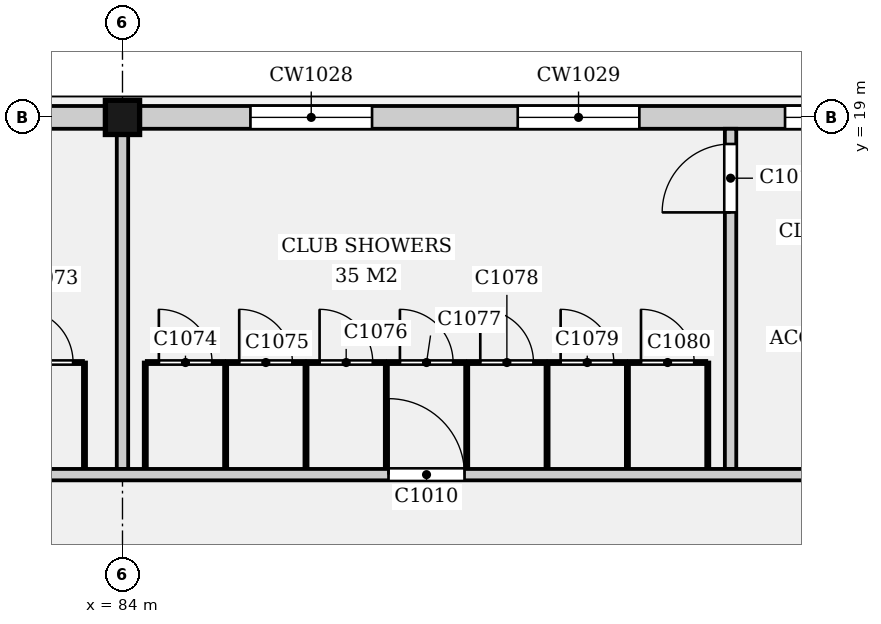
"""IFC4 building model, lengths in metres.
Left out: names, types, materials, properties, quantities, classifications, styles, units other than length and angle.
Written with IfcOpenShell. Run it as: python <this file> out.ifc"""

import sys

from ifc_helpers import new_model, si_unit, direction, frame, frame_2d, origin, origin_2d, place, context, subcontext, project, spatial, rectangle, extrude, element, fill, save


model = new_model("IFC4")
c1 = context("Model", 3, precision=1e-05, world=origin(), true_north=direction((0.0, 1.0)))
c2 = subcontext(c1, "Body", "Model", "MODEL_VIEW")
j1 = project(units=[si_unit("LENGTHUNIT", "METRE"), si_unit("PLANEANGLEUNIT", "RADIAN")], contexts=[c1])
p1 = place(None, origin())
s1 = spatial("IfcSite", under=j1, at=p1, CompositionType="ELEMENT")
p2 = place(p1, origin())
s2 = spatial("IfcBuilding", under=s1, at=p2, CompositionType="ELEMENT")
p3 = place(p2, frame((0.0, 0.0, 5.0)))
s3 = spatial("IfcBuildingStorey", under=s2, at=p3, CompositionType="ELEMENT", Elevation=5.0)
p4 = place(p3, frame((84.0, 19.0, 0.0), z_axis=(0.0, 0.0, 1.0), x_axis=(1.0, 0.0, 0.0)))
e1 = element("IfcColumn", 1, at=p4, inside=s3, PredefinedType="COLUMN", context=c2, shape_type="SweptSolid", body=[
    extrude(rectangle(XDim=0.45, YDim=0.45, at=origin_2d()), origin(), (0.0, 0.0, 1.0), 4.4),
])
p5 = place(p3, frame((72.225, 19.0, 0.0), z_axis=(0.0, 0.0, 1.0), x_axis=(1.0, 0.0, 0.0)))
e2 = element("IfcWall", 2, at=p5, inside=s3, PredefinedType="ELEMENTEDWALL", context=c2, shape_type="SweptSolid", body=[
    extrude(rectangle(XDim=11.55, YDim=0.3, at=frame_2d((5.775, 0.0))), origin(), (0.0, 0.0, 1.0), 3.98),
])
p6 = place(p5, frame((1.458, 0.0, 1.4)))
e3 = element("IfcOpeningElement", 3, at=p6, cuts=e2, PredefinedType="OPENING", context=c2, shape_type="SweptSolid", body=[
    extrude(rectangle(XDim=1.6, YDim=1.2, at=frame_2d((0.8, 0.6))), frame((0.0, 0.16, 0.0), z_axis=(0.0, -1.0, 0.0), x_axis=(1.0, 0.0, 0.0)), (0.0, 0.0, 1.0), 0.32),
])
p7 = place(p5, frame((4.975, 0.0, 1.4)))
e4 = element("IfcOpeningElement", 4, at=p7, cuts=e2, PredefinedType="OPENING", context=c2, shape_type="SweptSolid", body=[
    extrude(rectangle(XDim=1.6, YDim=1.2, at=frame_2d((0.8, 0.6))), frame((0.0, 0.16, 0.0), z_axis=(0.0, -1.0, 0.0), x_axis=(1.0, 0.0, 0.0)), (0.0, 0.0, 1.0), 0.32),
])
p8 = place(p5, frame((8.492, 0.0, 1.4)))
e5 = element("IfcOpeningElement", 5, at=p8, cuts=e2, PredefinedType="OPENING", context=c2, shape_type="SweptSolid", body=[
    extrude(rectangle(XDim=1.6, YDim=1.2, at=frame_2d((0.8, 0.6))), frame((0.0, 0.16, 0.0), z_axis=(0.0, -1.0, 0.0), x_axis=(1.0, 0.0, 0.0)), (0.0, 0.0, 1.0), 0.32),
])
p9 = place(p3, frame((84.225, 19.0, 0.0), z_axis=(0.0, 0.0, 1.0), x_axis=(1.0, 0.0, 0.0)))
e6 = element("IfcWall", 6, at=p9, inside=s3, PredefinedType="ELEMENTEDWALL", context=c2, shape_type="SweptSolid", body=[
    extrude(rectangle(XDim=11.55, YDim=0.3, at=frame_2d((5.775, 0.0))), origin(), (0.0, 0.0, 1.0), 3.98),
])
p10 = place(p9, frame((1.458, 0.0, 1.4)))
e7 = element("IfcOpeningElement", 7, at=p10, cuts=e6, PredefinedType="OPENING", context=c2, shape_type="SweptSolid", body=[
    extrude(rectangle(XDim=1.6, YDim=1.2, at=frame_2d((0.8, 0.6))), frame((0.0, 0.16, 0.0), z_axis=(0.0, -1.0, 0.0), x_axis=(1.0, 0.0, 0.0)), (0.0, 0.0, 1.0), 0.32),
])
p11 = place(p9, frame((4.975, 0.0, 1.4)))
e8 = element("IfcOpeningElement", 8, at=p11, cuts=e6, PredefinedType="OPENING", context=c2, shape_type="SweptSolid", body=[
    extrude(rectangle(XDim=1.6, YDim=1.2, at=frame_2d((0.8, 0.6))), frame((0.0, 0.16, 0.0), z_axis=(0.0, -1.0, 0.0), x_axis=(1.0, 0.0, 0.0)), (0.0, 0.0, 1.0), 0.32),
])
p12 = place(p9, frame((8.492, 0.0, 1.4)))
e9 = element("IfcOpeningElement", 9, at=p12, cuts=e6, PredefinedType="OPENING", context=c2, shape_type="SweptSolid", body=[
    extrude(rectangle(XDim=1.6, YDim=1.2, at=frame_2d((0.8, 0.6))), frame((0.0, 0.16, 0.0), z_axis=(0.0, -1.0, 0.0), x_axis=(1.0, 0.0, 0.0)), (0.0, 0.0, 1.0), 0.32),
])
p13 = place(p3, frame((55.3, 14.3, 0.0), z_axis=(0.0, 0.0, 1.0), x_axis=(1.0, 0.0, 0.0)))
e10 = element("IfcWall", 10, at=p13, inside=s3, PredefinedType="PARTITIONING", context=c2, shape_type="SweptSolid", body=[
    extrude(rectangle(XDim=93.4, YDim=0.15, at=frame_2d((46.7, 0.0))), origin(), (0.0, 0.0, 1.0), 3.98),
])
p14 = place(p13, frame((15.8, 0.0, 0.0)))
e11 = element("IfcOpeningElement", 11, at=p14, cuts=e10, PredefinedType="OPENING", context=c2, shape_type="SweptSolid", body=[
    extrude(rectangle(XDim=1.8, YDim=2.4, at=frame_2d((0.9, 1.2))), frame((0.0, 0.085, 0.0), z_axis=(0.0, -1.0, 0.0), x_axis=(1.0, 0.0, 0.0)), (0.0, 0.0, 1.0), 0.17),
])
p15 = place(p13, frame((32.2, 0.0, 0.0)))
e12 = element("IfcOpeningElement", 12, at=p15, cuts=e10, PredefinedType="OPENING", context=c2, shape_type="SweptSolid", body=[
    extrude(rectangle(XDim=1.0, YDim=2.1, at=frame_2d((0.5, 1.05))), frame((0.0, 0.085, 0.0), z_axis=(0.0, -1.0, 0.0), x_axis=(1.0, 0.0, 0.0)), (0.0, 0.0, 1.0), 0.17),
])
p16 = place(p13, frame((38.2, 0.0, 0.0)))
e13 = element("IfcOpeningElement", 13, at=p16, cuts=e10, PredefinedType="OPENING", context=c2, shape_type="SweptSolid", body=[
    extrude(rectangle(XDim=1.0, YDim=2.1, at=frame_2d((0.5, 1.05))), frame((0.0, 0.085, 0.0), z_axis=(0.0, -1.0, 0.0), x_axis=(1.0, 0.0, 0.0)), (0.0, 0.0, 1.0), 0.17),
])
p17 = place(p13, frame((45.7, 0.0, 0.0)))
e14 = element("IfcOpeningElement", 14, at=p17, cuts=e10, PredefinedType="OPENING", context=c2, shape_type="SweptSolid", body=[
    extrude(rectangle(XDim=0.9, YDim=2.1, at=frame_2d((0.45, 1.05))), frame((0.0, 0.085, 0.0), z_axis=(0.0, -1.0, 0.0), x_axis=(1.0, 0.0, 0.0)), (0.0, 0.0, 1.0), 0.17),
])
p18 = place(p13, frame((58.2, 0.0, 0.0)))
e15 = element("IfcOpeningElement", 15, at=p18, cuts=e10, PredefinedType="OPENING", context=c2, shape_type="SweptSolid", body=[
    extrude(rectangle(XDim=1.0, YDim=2.1, at=frame_2d((0.5, 1.05))), frame((0.0, 0.085, 0.0), z_axis=(0.0, -1.0, 0.0), x_axis=(1.0, 0.0, 0.0)), (0.0, 0.0, 1.0), 0.17),
])
p19 = place(p13, frame((70.2, 0.0, 0.0)))
e16 = element("IfcOpeningElement", 16, at=p19, cuts=e10, PredefinedType="OPENING", context=c2, shape_type="SweptSolid", body=[
    extrude(rectangle(XDim=1.0, YDim=2.1, at=frame_2d((0.5, 1.05))), frame((0.0, 0.085, 0.0), z_axis=(0.0, -1.0, 0.0), x_axis=(1.0, 0.0, 0.0)), (0.0, 0.0, 1.0), 0.17),
])
p20 = place(p13, frame((81.68, 0.0, 0.0)))
e17 = element("IfcOpeningElement", 17, at=p20, cuts=e10, PredefinedType="OPENING", context=c2, shape_type="SweptSolid", body=[
    extrude(rectangle(XDim=0.9, YDim=2.1, at=frame_2d((0.45, 1.05))), frame((0.0, 0.085, 0.0), z_axis=(0.0, -1.0, 0.0), x_axis=(1.0, 0.0, 0.0)), (0.0, 0.0, 1.0), 0.17),
])
p21 = place(p3, frame((84.0, 14.375, 0.0), z_axis=(0.0, 0.0, 1.0), x_axis=(0.0, 1.0, 0.0)))
e18 = element("IfcWall", 18, at=p21, inside=s3, PredefinedType="PARTITIONING", context=c2, shape_type="SweptSolid", body=[
    extrude(rectangle(XDim=4.4, YDim=0.15, at=frame_2d((2.2, 0.0))), origin(), (0.0, 0.0, 1.0), 3.98),
])
p22 = place(p3, frame((92.0, 14.375, 0.0), z_axis=(0.0, 0.0, 1.0), x_axis=(0.0, 1.0, 0.0)))
e19 = element("IfcWall", 19, at=p22, inside=s3, PredefinedType="PARTITIONING", context=c2, shape_type="SweptSolid", body=[
    extrude(rectangle(XDim=4.475, YDim=0.15, at=frame_2d((2.238, 0.0))), origin(), (0.0, 0.0, 1.0), 3.98),
])
p23 = place(p22, frame((3.375, 0.0, 0.0)))
e20 = element("IfcOpeningElement", 20, at=p23, cuts=e19, PredefinedType="OPENING", context=c2, shape_type="SweptSolid", body=[
    extrude(rectangle(XDim=0.9, YDim=2.1, at=frame_2d((0.45, 1.05))), frame((0.0, 0.085, 0.0), z_axis=(0.0, -1.0, 0.0), x_axis=(1.0, 0.0, 0.0)), (0.0, 0.0, 1.0), 0.17),
])
p24 = place(p3, frame((83.5, 14.375, 0.0), z_axis=(0.0, 0.0, 1.0), x_axis=(0.0, 1.0, 0.0)))
e21 = element("IfcWall", 21, at=p24, inside=s3, PredefinedType="PARTITIONING", context=c2, shape_type="SweptSolid", body=[
    extrude(rectangle(XDim=1.4, YDim=0.04, at=frame_2d((0.7, 0.0))), origin(), (0.0, 0.0, 1.0), 2.4),
])
p25 = place(p3, frame((82.52, 15.775, 0.0), z_axis=(0.0, 0.0, 1.0), x_axis=(1.0, 0.0, 0.0)))
e22 = element("IfcWall", 22, at=p25, inside=s3, PredefinedType="PARTITIONING", context=c2, shape_type="SweptSolid", body=[
    extrude(rectangle(XDim=0.96, YDim=0.04, at=frame_2d((0.48, 0.0))), origin(), (0.0, 0.0, 1.0), 2.4),
])
p26 = place(p25, frame((0.13, 0.0, 0.0)))
e23 = element("IfcOpeningElement", 23, at=p26, cuts=e22, PredefinedType="OPENING", context=c2, shape_type="SweptSolid", body=[
    extrude(rectangle(XDim=0.7, YDim=2.0, at=frame_2d((0.35, 1.0))), frame((0.0, 0.03, 0.0), z_axis=(0.0, -1.0, 0.0), x_axis=(1.0, 0.0, 0.0)), (0.0, 0.0, 1.0), 0.06),
])
for number, where, z_axis, x_axis in (
    (24, (84.3, 14.375, 0.0), (0.0, 0.0, 1.0), (0.0, 1.0, 0.0)),
    (25, (85.357, 14.375, 0.0), (0.0, 0.0, 1.0), (0.0, 1.0, 0.0)),
    (26, (86.414, 14.375, 0.0), (0.0, 0.0, 1.0), (0.0, 1.0, 0.0)),
    (27, (87.471, 14.375, 0.0), (0.0, 0.0, 1.0), (0.0, 1.0, 0.0)),
    (28, (88.529, 14.375, 0.0), (0.0, 0.0, 1.0), (0.0, 1.0, 0.0)),
    (29, (89.586, 14.375, 0.0), (0.0, 0.0, 1.0), (0.0, 1.0, 0.0)),
    (30, (90.643, 14.375, 0.0), (0.0, 0.0, 1.0), (0.0, 1.0, 0.0)),
    (31, (91.7, 14.375, 0.0), (0.0, 0.0, 1.0), (0.0, 1.0, 0.0)),
):
    element("IfcWall", number, at=place(p3, frame(where, z_axis=z_axis, x_axis=x_axis)), inside=s3, PredefinedType="PARTITIONING", context=c2, shape_type="SweptSolid", body=[
        extrude(rectangle(XDim=1.4, YDim=0.04, at=frame_2d((0.7, 0.0))), origin(), (0.0, 0.0, 1.0), 2.4),
    ])
p27 = place(p3, frame((84.32, 15.775, 0.0), z_axis=(0.0, 0.0, 1.0), x_axis=(1.0, 0.0, 0.0)))
e32 = element("IfcWall", 32, at=p27, inside=s3, PredefinedType="PARTITIONING", context=c2, shape_type="SweptSolid", body=[
    extrude(rectangle(XDim=1.017, YDim=0.04, at=frame_2d((0.509, 0.0))), origin(), (0.0, 0.0, 1.0), 2.4),
])
p28 = place(p27, frame((0.159, 0.0, 0.0)))
e33 = element("IfcOpeningElement", 33, at=p28, cuts=e32, PredefinedType="OPENING", context=c2, shape_type="SweptSolid", body=[
    extrude(rectangle(XDim=0.7, YDim=2.0, at=frame_2d((0.35, 1.0))), frame((0.0, 0.03, 0.0), z_axis=(0.0, -1.0, 0.0), x_axis=(1.0, 0.0, 0.0)), (0.0, 0.0, 1.0), 0.06),
])
p29 = place(p3, frame((85.377, 15.775, 0.0), z_axis=(0.0, 0.0, 1.0), x_axis=(1.0, 0.0, 0.0)))
e34 = element("IfcWall", 34, at=p29, inside=s3, PredefinedType="PARTITIONING", context=c2, shape_type="SweptSolid", body=[
    extrude(rectangle(XDim=1.017, YDim=0.04, at=frame_2d((0.509, 0.0))), origin(), (0.0, 0.0, 1.0), 2.4),
])
p30 = place(p29, frame((0.159, 0.0, 0.0)))
e35 = element("IfcOpeningElement", 35, at=p30, cuts=e34, PredefinedType="OPENING", context=c2, shape_type="SweptSolid", body=[
    extrude(rectangle(XDim=0.7, YDim=2.0, at=frame_2d((0.35, 1.0))), frame((0.0, 0.03, 0.0), z_axis=(0.0, -1.0, 0.0), x_axis=(1.0, 0.0, 0.0)), (0.0, 0.0, 1.0), 0.06),
])
p31 = place(p3, frame((86.434, 15.775, 0.0), z_axis=(0.0, 0.0, 1.0), x_axis=(1.0, 0.0, 0.0)))
e36 = element("IfcWall", 36, at=p31, inside=s3, PredefinedType="PARTITIONING", context=c2, shape_type="SweptSolid", body=[
    extrude(rectangle(XDim=1.017, YDim=0.04, at=frame_2d((0.509, 0.0))), origin(), (0.0, 0.0, 1.0), 2.4),
])
p32 = place(p31, frame((0.159, 0.0, 0.0)))
e37 = element("IfcOpeningElement", 37, at=p32, cuts=e36, PredefinedType="OPENING", context=c2, shape_type="SweptSolid", body=[
    extrude(rectangle(XDim=0.7, YDim=2.0, at=frame_2d((0.35, 1.0))), frame((0.0, 0.03, 0.0), z_axis=(0.0, -1.0, 0.0), x_axis=(1.0, 0.0, 0.0)), (0.0, 0.0, 1.0), 0.06),
])
p33 = place(p3, frame((87.491, 15.775, 0.0), z_axis=(0.0, 0.0, 1.0), x_axis=(1.0, 0.0, 0.0)))
e38 = element("IfcWall", 38, at=p33, inside=s3, PredefinedType="PARTITIONING", context=c2, shape_type="SweptSolid", body=[
    extrude(rectangle(XDim=1.017, YDim=0.04, at=frame_2d((0.509, 0.0))), origin(), (0.0, 0.0, 1.0), 2.4),
])
p34 = place(p33, frame((0.159, 0.0, 0.0)))
e39 = element("IfcOpeningElement", 39, at=p34, cuts=e38, PredefinedType="OPENING", context=c2, shape_type="SweptSolid", body=[
    extrude(rectangle(XDim=0.7, YDim=2.0, at=frame_2d((0.35, 1.0))), frame((0.0, 0.03, 0.0), z_axis=(0.0, -1.0, 0.0), x_axis=(1.0, 0.0, 0.0)), (0.0, 0.0, 1.0), 0.06),
])
p35 = place(p3, frame((88.549, 15.775, 0.0), z_axis=(0.0, 0.0, 1.0), x_axis=(1.0, 0.0, 0.0)))
e40 = element("IfcWall", 40, at=p35, inside=s3, PredefinedType="PARTITIONING", context=c2, shape_type="SweptSolid", body=[
    extrude(rectangle(XDim=1.017, YDim=0.04, at=frame_2d((0.509, 0.0))), origin(), (0.0, 0.0, 1.0), 2.4),
])
p36 = place(p35, frame((0.159, 0.0, 0.0)))
e41 = element("IfcOpeningElement", 41, at=p36, cuts=e40, PredefinedType="OPENING", context=c2, shape_type="SweptSolid", body=[
    extrude(rectangle(XDim=0.7, YDim=2.0, at=frame_2d((0.35, 1.0))), frame((0.0, 0.03, 0.0), z_axis=(0.0, -1.0, 0.0), x_axis=(1.0, 0.0, 0.0)), (0.0, 0.0, 1.0), 0.06),
])
p37 = place(p3, frame((89.606, 15.775, 0.0), z_axis=(0.0, 0.0, 1.0), x_axis=(1.0, 0.0, 0.0)))
e42 = element("IfcWall", 42, at=p37, inside=s3, PredefinedType="PARTITIONING", context=c2, shape_type="SweptSolid", body=[
    extrude(rectangle(XDim=1.017, YDim=0.04, at=frame_2d((0.509, 0.0))), origin(), (0.0, 0.0, 1.0), 2.4),
])
p38 = place(p37, frame((0.159, 0.0, 0.0)))
e43 = element("IfcOpeningElement", 43, at=p38, cuts=e42, PredefinedType="OPENING", context=c2, shape_type="SweptSolid", body=[
    extrude(rectangle(XDim=0.7, YDim=2.0, at=frame_2d((0.35, 1.0))), frame((0.0, 0.03, 0.0), z_axis=(0.0, -1.0, 0.0), x_axis=(1.0, 0.0, 0.0)), (0.0, 0.0, 1.0), 0.06),
])
p39 = place(p3, frame((90.663, 15.775, 0.0), z_axis=(0.0, 0.0, 1.0), x_axis=(1.0, 0.0, 0.0)))
e44 = element("IfcWall", 44, at=p39, inside=s3, PredefinedType="PARTITIONING", context=c2, shape_type="SweptSolid", body=[
    extrude(rectangle(XDim=1.017, YDim=0.04, at=frame_2d((0.509, 0.0))), origin(), (0.0, 0.0, 1.0), 2.4),
])
p40 = place(p39, frame((0.159, 0.0, 0.0)))
e45 = element("IfcOpeningElement", 45, at=p40, cuts=e44, PredefinedType="OPENING", context=c2, shape_type="SweptSolid", body=[
    extrude(rectangle(XDim=0.7, YDim=2.0, at=frame_2d((0.35, 1.0))), frame((0.0, 0.03, 0.0), z_axis=(0.0, -1.0, 0.0), x_axis=(1.0, 0.0, 0.0)), (0.0, 0.0, 1.0), 0.06),
])
p41 = place(p10, origin())
e46 = element("IfcWindow", 46, at=p41, inside=s3, PartitioningType="SINGLE_PANEL", PredefinedType="WINDOW", context=c2, shape_type="SweptSolid", body=[
    extrude(rectangle(XDim=1.6, YDim=1.2, at=frame_2d((0.8, 0.6))), frame((0.0, 0.03, 0.0), z_axis=(0.0, -1.0, 0.0), x_axis=(1.0, 0.0, 0.0)), (0.0, 0.0, 1.0), 0.06),
])
fill(e7, e46)
p42 = place(p11, origin())
e47 = element("IfcWindow", 47, at=p42, inside=s3, PartitioningType="SINGLE_PANEL", PredefinedType="WINDOW", context=c2, shape_type="SweptSolid", body=[
    extrude(rectangle(XDim=1.6, YDim=1.2, at=frame_2d((0.8, 0.6))), frame((0.0, 0.03, 0.0), z_axis=(0.0, -1.0, 0.0), x_axis=(1.0, 0.0, 0.0)), (0.0, 0.0, 1.0), 0.06),
])
fill(e8, e47)
p43 = place(p12, origin())
e48 = element("IfcWindow", 48, at=p43, inside=s3, PartitioningType="SINGLE_PANEL", PredefinedType="WINDOW", context=c2, shape_type="SweptSolid", body=[
    extrude(rectangle(XDim=1.6, YDim=1.2, at=frame_2d((0.8, 0.6))), frame((0.0, 0.03, 0.0), z_axis=(0.0, -1.0, 0.0), x_axis=(1.0, 0.0, 0.0)), (0.0, 0.0, 1.0), 0.06),
])
fill(e9, e48)
p44 = place(p15, origin())
e49 = element("IfcDoor", 49, at=p44, inside=s3, OperationType="SINGLE_SWING_LEFT", PredefinedType="DOOR", context=c2, shape_type="SweptSolid", body=[
    extrude(rectangle(XDim=1.0, YDim=2.1, at=frame_2d((0.5, 1.05))), frame((0.0, 0.025, 0.0), z_axis=(0.0, -1.0, 0.0), x_axis=(1.0, 0.0, 0.0)), (0.0, 0.0, 1.0), 0.05),
])
fill(e12, e49)
p45 = place(p23, origin())
e50 = element("IfcDoor", 50, at=p45, inside=s3, OperationType="SINGLE_SWING_LEFT", PredefinedType="DOOR", context=c2, shape_type="SweptSolid", body=[
    extrude(rectangle(XDim=0.9, YDim=2.1, at=frame_2d((0.45, 1.05))), frame((0.0, 0.025, 0.0), z_axis=(0.0, -1.0, 0.0), x_axis=(1.0, 0.0, 0.0)), (0.0, 0.0, 1.0), 0.05),
])
fill(e20, e50)
p46 = place(p26, origin())
e51 = element("IfcDoor", 51, at=p46, inside=s3, OperationType="SINGLE_SWING_LEFT", PredefinedType="DOOR", context=c2, shape_type="SweptSolid", body=[
    extrude(rectangle(XDim=0.7, YDim=2.0, at=frame_2d((0.35, 1.0))), frame((0.0, 0.02, 0.0), z_axis=(0.0, -1.0, 0.0), x_axis=(1.0, 0.0, 0.0)), (0.0, 0.0, 1.0), 0.04),
])
fill(e23, e51)
p47 = place(p28, origin())
e52 = element("IfcDoor", 52, at=p47, inside=s3, OperationType="SINGLE_SWING_LEFT", PredefinedType="DOOR", context=c2, shape_type="SweptSolid", body=[
    extrude(rectangle(XDim=0.7, YDim=2.0, at=frame_2d((0.35, 1.0))), frame((0.0, 0.02, 0.0), z_axis=(0.0, -1.0, 0.0), x_axis=(1.0, 0.0, 0.0)), (0.0, 0.0, 1.0), 0.04),
])
fill(e33, e52)
p48 = place(p30, origin())
e53 = element("IfcDoor", 53, at=p48, inside=s3, OperationType="SINGLE_SWING_LEFT", PredefinedType="DOOR", context=c2, shape_type="SweptSolid", body=[
    extrude(rectangle(XDim=0.7, YDim=2.0, at=frame_2d((0.35, 1.0))), frame((0.0, 0.02, 0.0), z_axis=(0.0, -1.0, 0.0), x_axis=(1.0, 0.0, 0.0)), (0.0, 0.0, 1.0), 0.04),
])
fill(e35, e53)
p49 = place(p32, origin())
e54 = element("IfcDoor", 54, at=p49, inside=s3, OperationType="SINGLE_SWING_LEFT", PredefinedType="DOOR", context=c2, shape_type="SweptSolid", body=[
    extrude(rectangle(XDim=0.7, YDim=2.0, at=frame_2d((0.35, 1.0))), frame((0.0, 0.02, 0.0), z_axis=(0.0, -1.0, 0.0), x_axis=(1.0, 0.0, 0.0)), (0.0, 0.0, 1.0), 0.04),
])
fill(e37, e54)
p50 = place(p34, origin())
e55 = element("IfcDoor", 55, at=p50, inside=s3, OperationType="SINGLE_SWING_LEFT", PredefinedType="DOOR", context=c2, shape_type="SweptSolid", body=[
    extrude(rectangle(XDim=0.7, YDim=2.0, at=frame_2d((0.35, 1.0))), frame((0.0, 0.02, 0.0), z_axis=(0.0, -1.0, 0.0), x_axis=(1.0, 0.0, 0.0)), (0.0, 0.0, 1.0), 0.04),
])
fill(e39, e55)
p51 = place(p36, origin())
e56 = element("IfcDoor", 56, at=p51, inside=s3, OperationType="SINGLE_SWING_LEFT", PredefinedType="DOOR", context=c2, shape_type="SweptSolid", body=[
    extrude(rectangle(XDim=0.7, YDim=2.0, at=frame_2d((0.35, 1.0))), frame((0.0, 0.02, 0.0), z_axis=(0.0, -1.0, 0.0), x_axis=(1.0, 0.0, 0.0)), (0.0, 0.0, 1.0), 0.04),
])
fill(e41, e56)
p52 = place(p38, origin())
e57 = element("IfcDoor", 57, at=p52, inside=s3, OperationType="SINGLE_SWING_LEFT", PredefinedType="DOOR", context=c2, shape_type="SweptSolid", body=[
    extrude(rectangle(XDim=0.7, YDim=2.0, at=frame_2d((0.35, 1.0))), frame((0.0, 0.02, 0.0), z_axis=(0.0, -1.0, 0.0), x_axis=(1.0, 0.0, 0.0)), (0.0, 0.0, 1.0), 0.04),
])
fill(e43, e57)
p53 = place(p40, origin())
e58 = element("IfcDoor", 58, at=p53, inside=s3, OperationType="SINGLE_SWING_LEFT", PredefinedType="DOOR", context=c2, shape_type="SweptSolid", body=[
    extrude(rectangle(XDim=0.7, YDim=2.0, at=frame_2d((0.35, 1.0))), frame((0.0, 0.02, 0.0), z_axis=(0.0, -1.0, 0.0), x_axis=(1.0, 0.0, 0.0)), (0.0, 0.0, 1.0), 0.04),
])
fill(e45, e58)
save(model, sys.argv[1])
